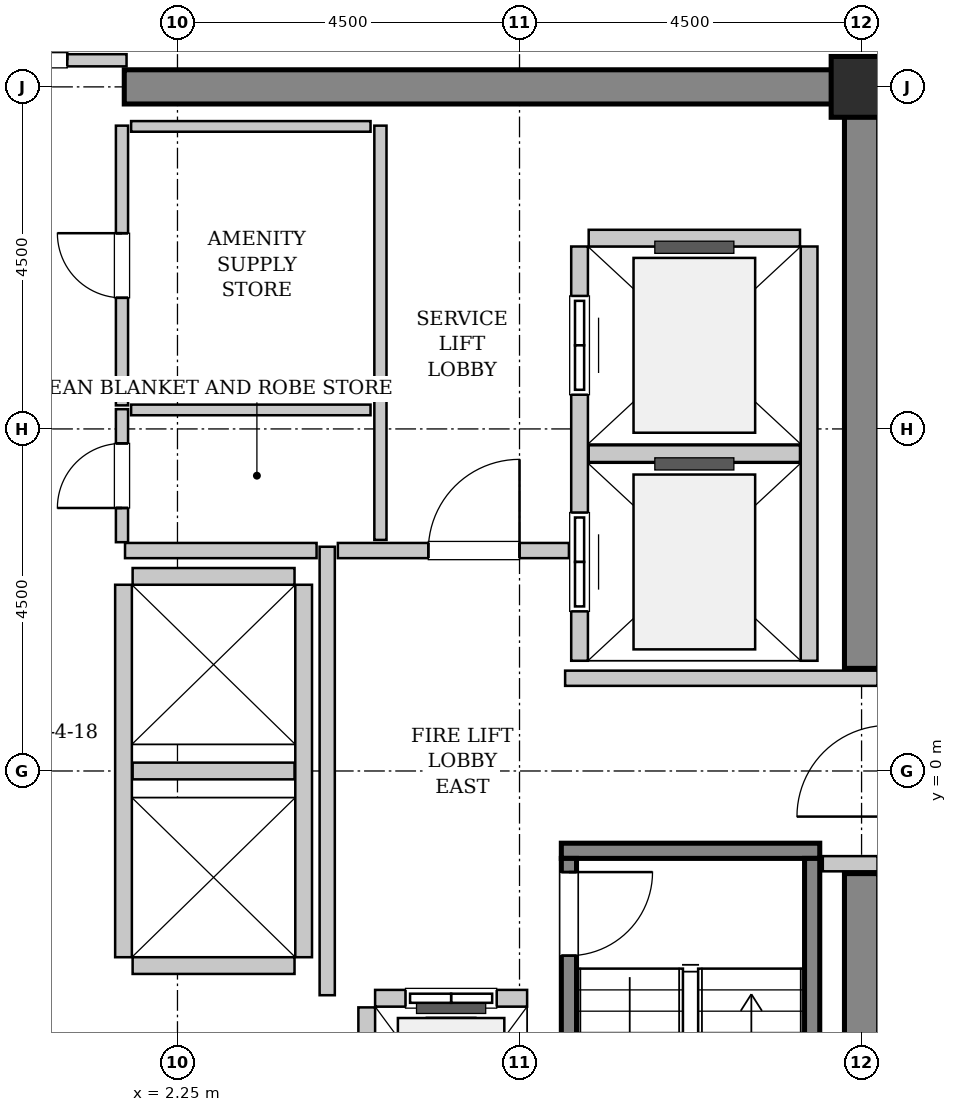
"""IFC4 building model, lengths in metres.
Left out: names, types, materials, properties, quantities, classifications, styles, units other than length and angle.
Written with IfcOpenShell. Run it as: python <this file> out.ifc"""

import sys

from ifc_helpers import new_model, si_unit, direction, frame, frame_2d, origin, origin_2d, place, context, subcontext, project, spatial, rectangle, hollow_rectangle, extrude, source, transform, mapped, element, fill, save


model = new_model("IFC4")
c1 = context("Model", 3, precision=1e-05, world=origin(), true_north=direction((0.0, 1.0)))
c2 = subcontext(c1, "Body", "Model", "MODEL_VIEW")
j1 = project(units=[si_unit("LENGTHUNIT", "METRE"), si_unit("PLANEANGLEUNIT", "RADIAN")], contexts=[c1])
p1 = place(None, origin())
s1 = spatial("IfcSite", under=j1, at=p1, CompositionType="ELEMENT")
p2 = place(p1, origin())
s2 = spatial("IfcBuilding", under=s1, at=p2, CompositionType="ELEMENT")
p3 = place(p2, frame((0.0, 0.0, 218.0)))
s3 = spatial("IfcBuildingStorey", under=s2, at=p3, CompositionType="ELEMENT", Elevation=218.0)
m1 = source(origin(), c2, "Body", "SweptSolid", [
    extrude(rectangle(XDim=9.925, YDim=0.45, at=frame_2d((4.962, 0.0))), origin(), (0.0, 0.0, 1.0), 3.8),
])
p4 = place(p3, frame((1.55, 9.0, 0.0), z_axis=(0.0, 0.0, 1.0), x_axis=(1.0, 0.0, 0.0)))
e1 = element("IfcWall", 1, at=p4, inside=s3, PredefinedType="SHEAR", context=c2, shape_type="MappedRepresentation", body=[
    mapped(m1, transform((0.0, 0.0, 0.0), x_axis=(1.0, 0.0, 0.0), y_axis=(0.0, 1.0, 0.0), z_axis=(0.0, 0.0, 1.0), scale=1.0)),
])
m2 = source(origin(), c2, "Body", "SweptSolid", [
    extrude(rectangle(XDim=7.425, YDim=0.45, at=frame_2d((3.712, 0.0))), origin(), (0.0, 0.0, 1.0), 3.8),
])
for number, where, z_axis, x_axis in (
    (2, (11.25, -8.775, 0.0), (0.0, 0.0, 1.0), (0.0, 1.0, 0.0)),
    (3, (11.25, 1.35, 0.0), (0.0, 0.0, 1.0), (0.0, 1.0, 0.0)),
):
    element("IfcWall", number, at=place(p3, frame(where, z_axis=z_axis, x_axis=x_axis)), inside=s3, PredefinedType="SHEAR", context=c2, shape_type="MappedRepresentation", body=[
        mapped(m2, transform((0.0, 0.0, 0.0), x_axis=(1.0, 0.0, 0.0), y_axis=(0.0, 1.0, 0.0), z_axis=(0.0, 0.0, 1.0), scale=1.0)),
    ])
m3 = source(origin(), c2, "Body", "SweptSolid", [
    extrude(hollow_rectangle(XDim=0.8, YDim=0.8, WallThickness=0.04, InnerFilletRadius=0.04, OuterFilletRadius=0.08, at=origin_2d()), origin(), (0.0, 0.0, 1.0), 3.8),
])
p5 = place(p3, frame((11.25, 9.0, 0.0), z_axis=(0.0, 0.0, 1.0), x_axis=(1.0, 0.0, 0.0)))
e4 = element("IfcColumn", 4, at=p5, inside=s3, PredefinedType="COLUMN", context=c2, shape_type="MappedRepresentation", body=[
    mapped(m3, transform((0.0, 0.0, 0.0), x_axis=(1.0, 0.0, 0.0), y_axis=(0.0, 1.0, 0.0), z_axis=(0.0, 0.0, 1.0), scale=1.0)),
])
m4 = source(origin(), c2, "Body", "SweptSolid", [
    extrude(rectangle(XDim=3.4, YDim=0.2, at=frame_2d((1.7, 0.0))), origin(), (0.0, 0.0, 1.0), 3.8),
])
p6 = place(p3, frame((7.3, -1.05, 0.0), z_axis=(0.0, 0.0, 1.0), x_axis=(1.0, 0.0, 0.0)))
e5 = element("IfcWall", 5, at=p6, inside=s3, PredefinedType="SOLIDWALL", context=c2, shape_type="MappedRepresentation", body=[
    mapped(m4, transform((0.0, 0.0, 0.0), x_axis=(1.0, 0.0, 0.0), y_axis=(0.0, 1.0, 0.0), z_axis=(0.0, 0.0, 1.0), scale=1.0)),
])
m5 = source(origin(), c2, "Body", "SweptSolid", [
    extrude(rectangle(XDim=7.1, YDim=0.2, at=frame_2d((3.55, 0.0))), origin(), (0.0, 0.0, 1.0), 3.8),
])
p7 = place(p3, frame((7.4, -1.15, 0.0), z_axis=(0.0, 0.0, 1.0), x_axis=(0.0, -1.0, 0.0)))
e6 = element("IfcWall", 6, at=p7, inside=s3, PredefinedType="SOLIDWALL", context=c2, shape_type="MappedRepresentation", body=[
    mapped(m5, transform((0.0, 0.0, 0.0), x_axis=(1.0, 0.0, 0.0), y_axis=(0.0, 1.0, 0.0), z_axis=(0.0, 0.0, 1.0), scale=1.0)),
])
p8 = place(p7, frame((0.18, 0.0, 0.0)))
e7 = element("IfcOpeningElement", 7, at=p8, cuts=e6, PredefinedType="OPENING", context=c2, shape_type="SweptSolid", body=[
    extrude(rectangle(XDim=1.1, YDim=2.15, at=frame_2d((0.55, 1.075))), frame((0.0, 0.11, 0.0), z_axis=(0.0, -1.0, 0.0), x_axis=(1.0, 0.0, 0.0)), (0.0, 0.0, 1.0), 0.22),
])
p9 = place(p3, frame((10.6, -1.15, 0.0), z_axis=(0.0, 0.0, 1.0), x_axis=(0.0, -1.0, 0.0)))
e8 = element("IfcWall", 8, at=p9, inside=s3, PredefinedType="SOLIDWALL", context=c2, shape_type="MappedRepresentation", body=[
    mapped(m5, transform((0.0, 0.0, 0.0), x_axis=(1.0, 0.0, 0.0), y_axis=(0.0, 1.0, 0.0), z_axis=(0.0, 0.0, 1.0), scale=1.0)),
])
m6 = source(origin(), c2, "Body", "SweptSolid", [
    extrude(rectangle(XDim=2.0, YDim=0.22, at=frame_2d((1.0, 0.0))), origin(), (0.0, 0.0, 1.0), 3.535),
])
p10 = place(p3, frame((6.85, -2.99, 0.0), z_axis=(0.0, 0.0, 1.0), x_axis=(-1.0, 0.0, 0.0)))
e9 = element("IfcWall", 9, at=p10, inside=s3, PredefinedType="SOLIDWALL", context=c2, shape_type="MappedRepresentation", body=[
    mapped(m6, transform((0.0, 0.0, 0.0), x_axis=(1.0, 0.0, 0.0), y_axis=(0.0, 1.0, 0.0), z_axis=(0.0, 0.0, 1.0), scale=1.0)),
])
p11 = place(p10, frame((0.4, 0.0, 0.0)))
e10 = element("IfcOpeningElement", 10, at=p11, cuts=e9, PredefinedType="OPENING", context=c2, shape_type="SweptSolid", body=[
    extrude(rectangle(XDim=1.2, YDim=2.2, at=frame_2d((0.6, 1.1))), frame((0.0, 0.12, 0.0), z_axis=(0.0, -1.0, 0.0), x_axis=(1.0, 0.0, 0.0)), (0.0, 0.0, 1.0), 0.24),
])
m7 = source(origin(), c2, "Body", "SweptSolid", [
    extrude(rectangle(XDim=2.68, YDim=0.22, at=frame_2d((1.34, 0.0))), origin(), (0.0, 0.0, 1.0), 3.535),
])
p12 = place(p3, frame((4.74, -3.11, 0.0), z_axis=(0.0, 0.0, 1.0), x_axis=(0.0, -1.0, 0.0)))
e11 = element("IfcWall", 11, at=p12, inside=s3, PredefinedType="SOLIDWALL", context=c2, shape_type="MappedRepresentation", body=[
    mapped(m7, transform((0.0, 0.0, 0.0), x_axis=(1.0, 0.0, 0.0), y_axis=(0.0, 1.0, 0.0), z_axis=(0.0, 0.0, 1.0), scale=1.0)),
])
m8 = source(origin(), c2, "Body", "SweptSolid", [
    extrude(rectangle(XDim=5.45, YDim=0.22, at=frame_2d((2.725, 0.0))), origin(), (0.0, 0.0, 1.0), 3.535),
])
p13 = place(p3, frame((7.54, 6.9, 0.0), z_axis=(0.0, 0.0, 1.0), x_axis=(0.0, -1.0, 0.0)))
e12 = element("IfcWall", 12, at=p13, inside=s3, PredefinedType="SOLIDWALL", context=c2, shape_type="MappedRepresentation", body=[
    mapped(m8, transform((0.0, 0.0, 0.0), x_axis=(1.0, 0.0, 0.0), y_axis=(0.0, 1.0, 0.0), z_axis=(0.0, 0.0, 1.0), scale=1.0)),
])
p14 = place(p13, frame((3.5, 0.0, 0.0)))
e13 = element("IfcOpeningElement", 13, at=p14, cuts=e12, PredefinedType="OPENING", context=c2, shape_type="SweptSolid", body=[
    extrude(rectangle(XDim=1.3, YDim=2.3, at=frame_2d((0.65, 1.15))), frame((0.0, 0.12, 0.0), z_axis=(0.0, -1.0, 0.0), x_axis=(1.0, 0.0, 0.0)), (0.0, 0.0, 1.0), 0.24),
])
p15 = place(p13, frame((0.65, 0.0, 0.0)))
e14 = element("IfcOpeningElement", 14, at=p15, cuts=e12, PredefinedType="OPENING", context=c2, shape_type="SweptSolid", body=[
    extrude(rectangle(XDim=1.3, YDim=2.3, at=frame_2d((0.65, 1.15))), frame((0.0, 0.12, 0.0), z_axis=(0.0, -1.0, 0.0), x_axis=(1.0, 0.0, 0.0)), (0.0, 0.0, 1.0), 0.24),
])
p16 = place(p3, frame((10.56, 1.45, 0.0), z_axis=(0.0, 0.0, 1.0), x_axis=(0.0, 1.0, 0.0)))
e15 = element("IfcWall", 15, at=p16, inside=s3, PredefinedType="SOLIDWALL", context=c2, shape_type="MappedRepresentation", body=[
    mapped(m8, transform((0.0, 0.0, 0.0), x_axis=(1.0, 0.0, 0.0), y_axis=(0.0, 1.0, 0.0), z_axis=(0.0, 0.0, 1.0), scale=1.0)),
])
m9 = source(origin(), c2, "Body", "SweptSolid", [
    extrude(rectangle(XDim=2.78, YDim=0.22, at=frame_2d((1.39, 0.0))), origin(), (0.0, 0.0, 1.0), 3.535),
])
for number, where, z_axis, x_axis in (
    (16, (7.66, 4.175, 0.0), (0.0, 0.0, 1.0), (1.0, 0.0, 0.0)),
    (17, (10.44, 7.01, 0.0), (0.0, 0.0, 1.0), (-1.0, 0.0, 0.0)),
):
    element("IfcWall", number, at=place(p3, frame(where, z_axis=z_axis, x_axis=x_axis)), inside=s3, PredefinedType="SOLIDWALL", context=c2, shape_type="MappedRepresentation", body=[
        mapped(m9, transform((0.0, 0.0, 0.0), x_axis=(1.0, 0.0, 0.0), y_axis=(0.0, 1.0, 0.0), z_axis=(0.0, 0.0, 1.0), scale=1.0)),
    ])
m10 = source(origin(), c2, "Body", "SweptSolid", [
    extrude(rectangle(XDim=4.9, YDim=0.22, at=frame_2d((2.45, 0.0))), origin(), (0.0, 0.0, 1.0), 3.535),
])
for number, where, z_axis, x_axis in (
    (18, (1.54, 2.45, 0.0), (0.0, 0.0, 1.0), (0.0, -1.0, 0.0)),
    (19, (3.91, -2.45, 0.0), (0.0, 0.0, 1.0), (0.0, 1.0, 0.0)),
):
    element("IfcWall", number, at=place(p3, frame(where, z_axis=z_axis, x_axis=x_axis)), inside=s3, PredefinedType="SOLIDWALL", context=c2, shape_type="MappedRepresentation", body=[
        mapped(m10, transform((0.0, 0.0, 0.0), x_axis=(1.0, 0.0, 0.0), y_axis=(0.0, 1.0, 0.0), z_axis=(0.0, 0.0, 1.0), scale=1.0)),
    ])
m11 = source(origin(), c2, "Body", "SweptSolid", [
    extrude(rectangle(XDim=2.13, YDim=0.22, at=frame_2d((1.065, 0.0))), origin(), (0.0, 0.0, 1.0), 3.535),
])
for number, where, z_axis, x_axis in (
    (20, (1.66, -2.56, 0.0), (0.0, 0.0, 1.0), (1.0, 0.0, 0.0)),
    (21, (1.66, 0.0, 0.0), (0.0, 0.0, 1.0), (1.0, 0.0, 0.0)),
    (22, (3.79, 2.56, 0.0), (0.0, 0.0, 1.0), (-1.0, 0.0, 0.0)),
):
    element("IfcWall", number, at=place(p3, frame(where, z_axis=z_axis, x_axis=x_axis)), inside=s3, PredefinedType="SOLIDWALL", context=c2, shape_type="MappedRepresentation", body=[
        mapped(m11, transform((0.0, 0.0, 0.0), x_axis=(1.0, 0.0, 0.0), y_axis=(0.0, 1.0, 0.0), z_axis=(0.0, 0.0, 1.0), scale=1.0)),
    ])
m12 = source(origin(), c2, "Body", "SweptSolid", [
    extrude(rectangle(XDim=5.9, YDim=0.2, at=frame_2d((2.95, 0.0))), origin(), (0.0, 0.0, 1.0), 3.535),
])
p17 = place(p3, frame((4.22, -2.95, 0.0), z_axis=(0.0, 0.0, 1.0), x_axis=(0.0, 1.0, 0.0)))
e23 = element("IfcWall", 23, at=p17, inside=s3, PredefinedType="PARTITIONING", context=c2, shape_type="MappedRepresentation", body=[
    mapped(m12, transform((0.0, 0.0, 0.0), x_axis=(1.0, 0.0, 0.0), y_axis=(0.0, 1.0, 0.0), z_axis=(0.0, 0.0, 1.0), scale=1.0)),
])
m13 = source(origin(), c2, "Body", "SweptSolid", [
    extrude(rectangle(XDim=2.52, YDim=0.2, at=frame_2d((1.26, 0.0))), origin(), (0.0, 0.0, 1.0), 3.535),
])
p18 = place(p3, frame((1.56, 2.9, 0.0), z_axis=(0.0, 0.0, 1.0), x_axis=(1.0, 0.0, 0.0)))
e24 = element("IfcWall", 24, at=p18, inside=s3, PredefinedType="PARTITIONING", context=c2, shape_type="MappedRepresentation", body=[
    mapped(m13, transform((0.0, 0.0, 0.0), x_axis=(1.0, 0.0, 0.0), y_axis=(0.0, 1.0, 0.0), z_axis=(0.0, 0.0, 1.0), scale=1.0)),
])
m14 = source(origin(), c2, "Body", "SweptSolid", [
    extrude(rectangle(XDim=3.04, YDim=0.2, at=frame_2d((1.52, 0.0))), origin(), (0.0, 0.0, 1.0), 3.535),
])
p19 = place(p3, frame((4.36, 2.9, 0.0), z_axis=(0.0, 0.0, 1.0), x_axis=(1.0, 0.0, 0.0)))
e25 = element("IfcWall", 25, at=p19, inside=s3, PredefinedType="PARTITIONING", context=c2, shape_type="MappedRepresentation", body=[
    mapped(m14, transform((0.0, 0.0, 0.0), x_axis=(1.0, 0.0, 0.0), y_axis=(0.0, 1.0, 0.0), z_axis=(0.0, 0.0, 1.0), scale=1.0)),
])
p20 = place(p19, frame((1.19, 0.0, 0.0)))
e26 = element("IfcOpeningElement", 26, at=p20, cuts=e25, PredefinedType="OPENING", context=c2, shape_type="SweptSolid", body=[
    extrude(rectangle(XDim=1.2, YDim=2.15, at=frame_2d((0.6, 1.075))), frame((0.0, 0.11, 0.0), z_axis=(0.0, -1.0, 0.0), x_axis=(1.0, 0.0, 0.0)), (0.0, 0.0, 1.0), 0.22),
])
m15 = source(origin(), c2, "Body", "SweptSolid", [
    extrude(rectangle(XDim=4.11, YDim=0.2, at=frame_2d((2.055, 0.0))), origin(), (0.0, 0.0, 1.0), 3.535),
])
p21 = place(p3, frame((7.35, 1.22, 0.0), z_axis=(0.0, 0.0, 1.0), x_axis=(1.0, 0.0, 0.0)))
e27 = element("IfcWall", 27, at=p21, inside=s3, PredefinedType="PARTITIONING", context=c2, shape_type="MappedRepresentation", body=[
    mapped(m15, transform((0.0, 0.0, 0.0), x_axis=(1.0, 0.0, 0.0), y_axis=(0.0, 1.0, 0.0), z_axis=(0.0, 0.0, 1.0), scale=1.0)),
])
m16 = source(origin(), c2, "Body", "SweptSolid", [
    extrude(rectangle(XDim=0.72, YDim=0.2, at=frame_2d((0.36, 0.0))), origin(), (0.0, 0.0, 1.0), 3.535),
])
p22 = place(p3, frame((10.74, -1.22, 0.0), z_axis=(0.0, 0.0, 1.0), x_axis=(1.0, 0.0, 0.0)))
e28 = element("IfcWall", 28, at=p22, inside=s3, PredefinedType="PARTITIONING", context=c2, shape_type="MappedRepresentation", body=[
    mapped(m16, transform((0.0, 0.0, 0.0), x_axis=(1.0, 0.0, 0.0), y_axis=(0.0, 1.0, 0.0), z_axis=(0.0, 0.0, 1.0), scale=1.0)),
])
m17 = source(origin(), c2, "Body", "SweptSolid", [
    extrude(rectangle(XDim=3.16, YDim=0.16, at=frame_2d((1.58, 0.0))), origin(), (0.0, 0.0, 1.0), 2.625),
])
p23 = place(p3, frame((-1.58, 9.35, 0.0), z_axis=(0.0, 0.0, 1.0), x_axis=(1.0, 0.0, 0.0)))
e29 = element("IfcWall", 29, at=p23, inside=s3, PredefinedType="PARTITIONING", context=c2, shape_type="MappedRepresentation", body=[
    mapped(m17, transform((0.0, 0.0, 0.0), x_axis=(1.0, 0.0, 0.0), y_axis=(0.0, 1.0, 0.0), z_axis=(0.0, 0.0, 1.0), scale=1.0)),
])
p24 = place(p23, frame((0.78, 0.0, 0.0)))
e30 = element("IfcOpeningElement", 30, at=p24, cuts=e29, PredefinedType="OPENING", context=c2, shape_type="SweptSolid", body=[
    extrude(rectangle(XDim=1.6, YDim=2.3, at=frame_2d((0.8, 1.15))), frame((0.0, 0.09, 0.0), z_axis=(0.0, -1.0, 0.0), x_axis=(1.0, 0.0, 0.0)), (0.0, 0.0, 1.0), 0.18),
])
m18 = source(origin(), c2, "Body", "SweptSolid", [
    extrude(rectangle(XDim=5.45, YDim=0.16, at=frame_2d((2.725, 0.0))), origin(), (0.0, 0.0, 1.0), 3.535),
])
p25 = place(p3, frame((4.92, 3.04, 0.0), z_axis=(0.0, 0.0, 1.0), x_axis=(0.0, 1.0, 0.0)))
e31 = element("IfcWall", 31, at=p25, inside=s3, PredefinedType="PARTITIONING", context=c2, shape_type="MappedRepresentation", body=[
    mapped(m18, transform((0.0, 0.0, 0.0), x_axis=(1.0, 0.0, 0.0), y_axis=(0.0, 1.0, 0.0), z_axis=(0.0, 0.0, 1.0), scale=1.0)),
])
m19 = source(origin(), c2, "Body", "SweptSolid", [
    extrude(rectangle(XDim=1.75, YDim=0.16, at=frame_2d((0.875, 0.0))), origin(), (0.0, 0.0, 1.0), 3.535),
])
p26 = place(p3, frame((1.52, 3.01, 0.0), z_axis=(0.0, 0.0, 1.0), x_axis=(0.0, 1.0, 0.0)))
e32 = element("IfcWall", 32, at=p26, inside=s3, PredefinedType="PARTITIONING", context=c2, shape_type="MappedRepresentation", body=[
    mapped(m19, transform((0.0, 0.0, 0.0), x_axis=(1.0, 0.0, 0.0), y_axis=(0.0, 1.0, 0.0), z_axis=(0.0, 0.0, 1.0), scale=1.0)),
])
p27 = place(p26, frame((0.45, 0.0, 0.0)))
e33 = element("IfcOpeningElement", 33, at=p27, cuts=e32, PredefinedType="OPENING", context=c2, shape_type="SweptSolid", body=[
    extrude(rectangle(XDim=0.85, YDim=2.1, at=frame_2d((0.425, 1.05))), frame((0.0, 0.09, 0.0), z_axis=(0.0, -1.0, 0.0), x_axis=(1.0, 0.0, 0.0)), (0.0, 0.0, 1.0), 0.18),
])
m20 = source(origin(), c2, "Body", "SweptSolid", [
    extrude(rectangle(XDim=3.15, YDim=0.14, at=frame_2d((1.575, 0.0))), origin(), (0.0, 0.0, 1.0), 3.535),
])
p28 = place(p3, frame((1.64, 4.75, 0.0), z_axis=(0.0, 0.0, 1.0), x_axis=(1.0, 0.0, 0.0)))
e34 = element("IfcWall", 34, at=p28, inside=s3, PredefinedType="PARTITIONING", context=c2, shape_type="MappedRepresentation", body=[
    mapped(m20, transform((0.0, 0.0, 0.0), x_axis=(1.0, 0.0, 0.0), y_axis=(0.0, 1.0, 0.0), z_axis=(0.0, 0.0, 1.0), scale=1.0)),
])
m21 = source(origin(), c2, "Body", "SweptSolid", [
    extrude(rectangle(XDim=3.68, YDim=0.16, at=frame_2d((1.84, 0.0))), origin(), (0.0, 0.0, 1.0), 3.535),
])
p29 = place(p3, frame((1.52, 4.81, 0.0), z_axis=(0.0, 0.0, 1.0), x_axis=(0.0, 1.0, 0.0)))
e35 = element("IfcWall", 35, at=p29, inside=s3, PredefinedType="PARTITIONING", context=c2, shape_type="MappedRepresentation", body=[
    mapped(m21, transform((0.0, 0.0, 0.0), x_axis=(1.0, 0.0, 0.0), y_axis=(0.0, 1.0, 0.0), z_axis=(0.0, 0.0, 1.0), scale=1.0)),
])
p30 = place(p29, frame((1.415, 0.0, 0.0)))
e36 = element("IfcOpeningElement", 36, at=p30, cuts=e35, PredefinedType="OPENING", context=c2, shape_type="SweptSolid", body=[
    extrude(rectangle(XDim=0.85, YDim=2.1, at=frame_2d((0.425, 1.05))), frame((0.0, 0.09, 0.0), z_axis=(0.0, -1.0, 0.0), x_axis=(1.0, 0.0, 0.0)), (0.0, 0.0, 1.0), 0.18),
])
p31 = place(p3, frame((1.64, 8.48, 0.0), z_axis=(0.0, 0.0, 1.0), x_axis=(1.0, 0.0, 0.0)))
e37 = element("IfcWall", 37, at=p31, inside=s3, PredefinedType="PARTITIONING", context=c2, shape_type="MappedRepresentation", body=[
    mapped(m20, transform((0.0, 0.0, 0.0), x_axis=(1.0, 0.0, 0.0), y_axis=(0.0, 1.0, 0.0), z_axis=(0.0, 0.0, 1.0), scale=1.0)),
])
m22 = source(origin(), c2, "Body", "SweptSolid", [
    extrude(rectangle(XDim=1.1, YDim=2.15, at=frame_2d((0.55, 1.075))), frame((0.0, 0.025, 0.0), z_axis=(0.0, -1.0, 0.0), x_axis=(1.0, 0.0, 0.0)), (0.0, 0.0, 1.0), 0.05),
])
p32 = place(p8, origin())
e38 = element("IfcDoor", 38, at=p32, inside=s3, OperationType="SINGLE_SWING_LEFT", PredefinedType="DOOR", context=c2, shape_type="MappedRepresentation", body=[
    mapped(m22, transform((0.0, 0.0, 0.0), x_axis=(1.0, 0.0, 0.0), y_axis=(0.0, 1.0, 0.0), z_axis=(0.0, 0.0, 1.0), scale=1.0)),
])
fill(e7, e38)
m23 = source(origin(), c2, "Body", "SweptSolid", [
    extrude(rectangle(XDim=1.2, YDim=2.2, at=frame_2d((0.6, 1.1))), frame((0.0, 0.025, 0.0), z_axis=(0.0, -1.0, 0.0), x_axis=(1.0, 0.0, 0.0)), (0.0, 0.0, 1.0), 0.05),
])
p33 = place(p11, origin())
e39 = element("IfcDoor", 39, at=p33, inside=s3, OperationType="SLIDING_TO_LEFT", PredefinedType="DOOR", context=c2, shape_type="MappedRepresentation", body=[
    mapped(m23, transform((0.0, 0.0, 0.0), x_axis=(1.0, 0.0, 0.0), y_axis=(0.0, 1.0, 0.0), z_axis=(0.0, 0.0, 1.0), scale=1.0)),
])
fill(e10, e39)
m24 = source(origin(), c2, "Body", "SweptSolid", [
    extrude(rectangle(XDim=1.3, YDim=2.3, at=frame_2d((0.65, 1.15))), frame((0.0, 0.025, 0.0), z_axis=(0.0, -1.0, 0.0), x_axis=(1.0, 0.0, 0.0)), (0.0, 0.0, 1.0), 0.05),
])
p34 = place(p14, origin())
e40 = element("IfcDoor", 40, at=p34, inside=s3, OperationType="SLIDING_TO_RIGHT", PredefinedType="DOOR", context=c2, shape_type="MappedRepresentation", body=[
    mapped(m24, transform((0.0, 0.0, 0.0), x_axis=(1.0, 0.0, 0.0), y_axis=(0.0, 1.0, 0.0), z_axis=(0.0, 0.0, 1.0), scale=1.0)),
])
fill(e13, e40)
p35 = place(p15, origin())
e41 = element("IfcDoor", 41, at=p35, inside=s3, OperationType="SLIDING_TO_RIGHT", PredefinedType="DOOR", context=c2, shape_type="MappedRepresentation", body=[
    mapped(m24, transform((0.0, 0.0, 0.0), x_axis=(1.0, 0.0, 0.0), y_axis=(0.0, 1.0, 0.0), z_axis=(0.0, 0.0, 1.0), scale=1.0)),
])
fill(e14, e41)
m25 = source(origin(), c2, "Body", "SweptSolid", [
    extrude(rectangle(XDim=1.2, YDim=2.15, at=frame_2d((0.6, 1.075))), frame((0.0, 0.025, 0.0), z_axis=(0.0, -1.0, 0.0), x_axis=(1.0, 0.0, 0.0)), (0.0, 0.0, 1.0), 0.05),
])
p36 = place(p20, origin())
e42 = element("IfcDoor", 42, at=p36, inside=s3, OperationType="SINGLE_SWING_RIGHT", PredefinedType="DOOR", context=c2, shape_type="MappedRepresentation", body=[
    mapped(m25, transform((0.0, 0.0, 0.0), x_axis=(1.0, 0.0, 0.0), y_axis=(0.0, 1.0, 0.0), z_axis=(0.0, 0.0, 1.0), scale=1.0)),
])
fill(e26, e42)
m26 = source(origin(), c2, "Body", "SweptSolid", [
    extrude(rectangle(XDim=1.6, YDim=2.3, at=frame_2d((0.8, 1.15))), frame((0.0, 0.025, 0.0), z_axis=(0.0, -1.0, 0.0), x_axis=(1.0, 0.0, 0.0)), (0.0, 0.0, 1.0), 0.05),
])
p37 = place(p24, origin())
e43 = element("IfcDoor", 43, at=p37, inside=s3, OperationType="DOUBLE_DOOR_SINGLE_SWING", PredefinedType="DOOR", context=c2, shape_type="MappedRepresentation", body=[
    mapped(m26, transform((0.0, 0.0, 0.0), x_axis=(1.0, 0.0, 0.0), y_axis=(0.0, 1.0, 0.0), z_axis=(0.0, 0.0, 1.0), scale=1.0)),
])
fill(e30, e43)
m27 = source(origin(), c2, "Body", "SweptSolid", [
    extrude(rectangle(XDim=0.85, YDim=2.1, at=frame_2d((0.425, 1.05))), frame((0.0, 0.025, 0.0), z_axis=(0.0, -1.0, 0.0), x_axis=(1.0, 0.0, 0.0)), (0.0, 0.0, 1.0), 0.05),
])
p38 = place(p27, origin())
e44 = element("IfcDoor", 44, at=p38, inside=s3, OperationType="SINGLE_SWING_LEFT", PredefinedType="DOOR", context=c2, shape_type="MappedRepresentation", body=[
    mapped(m27, transform((0.0, 0.0, 0.0), x_axis=(1.0, 0.0, 0.0), y_axis=(0.0, 1.0, 0.0), z_axis=(0.0, 0.0, 1.0), scale=1.0)),
])
fill(e33, e44)
p39 = place(p30, origin())
e45 = element("IfcDoor", 45, at=p39, inside=s3, OperationType="SINGLE_SWING_RIGHT", PredefinedType="DOOR", context=c2, shape_type="MappedRepresentation", body=[
    mapped(m27, transform((0.0, 0.0, 0.0), x_axis=(1.0, 0.0, 0.0), y_axis=(0.0, 1.0, 0.0), z_axis=(0.0, 0.0, 1.0), scale=1.0)),
])
fill(e36, e45)
save(model, sys.argv[1])
